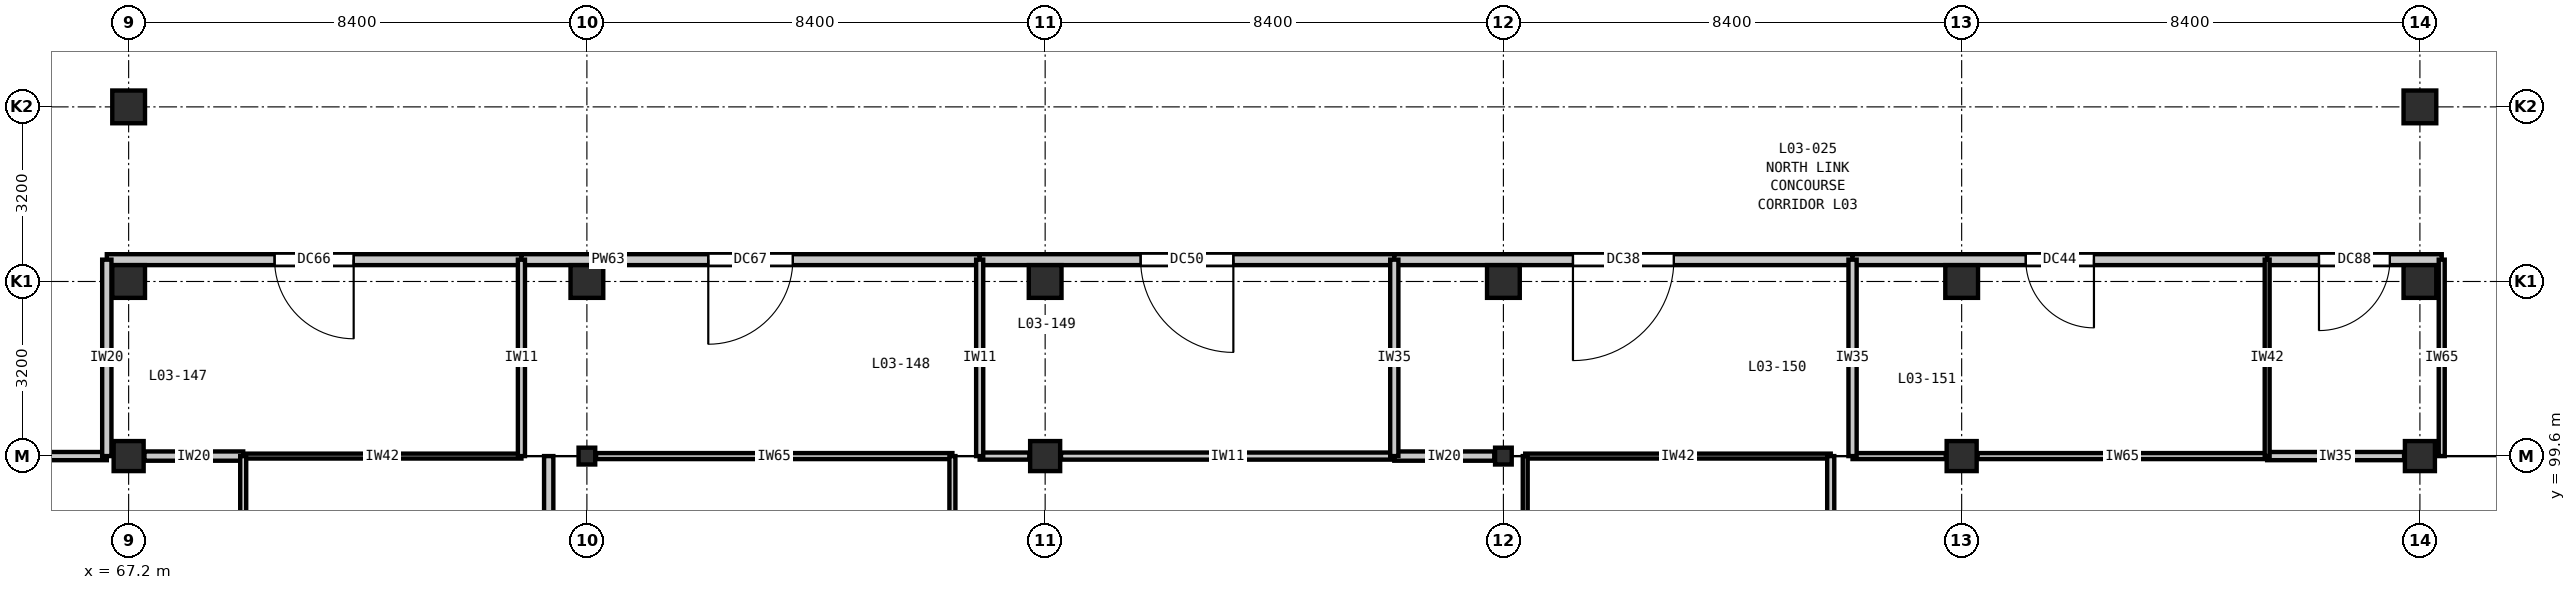
"""IFC4 building model, lengths in metres.
Left out: names, types, materials, properties, quantities, classifications, styles, units other than length and angle.
Written with IfcOpenShell. Run it as: python <this file> out.ifc"""

import sys

from ifc_helpers import new_model, si_unit, direction, frame, frame_2d, origin, origin_2d, place, context, subcontext, project, spatial, rectangle, i_section, extrude, element, fill, save


model = new_model("IFC4")
c1 = context("Model", 3, precision=1e-05, world=origin(), true_north=direction((0.0, 1.0)))
c2 = subcontext(c1, "Body", "Model", "MODEL_VIEW")
j1 = project(units=[si_unit("LENGTHUNIT", "METRE"), si_unit("PLANEANGLEUNIT", "RADIAN")], contexts=[c1])
p1 = place(None, origin())
s1 = spatial("IfcSite", under=j1, at=p1, CompositionType="ELEMENT")
p2 = place(p1, origin())
s2 = spatial("IfcBuilding", under=s1, at=p2, CompositionType="ELEMENT")
p3 = place(p2, frame((0.0, 0.0, 16.2)))
s3 = spatial("IfcBuildingStorey", under=s2, at=p3, CompositionType="ELEMENT", Elevation=16.2)
p4 = place(p3, frame((67.2, 99.6, 0.0), z_axis=(0.0, 0.0, 1.0), x_axis=(1.0, 0.0, 0.0)))
e1 = element("IfcColumn", 1, at=p4, inside=s3, PredefinedType="COLUMN", context=c2, shape_type="SweptSolid", body=[
    extrude(rectangle(XDim=0.55, YDim=0.55, at=origin_2d()), origin(), (0.0, 0.0, 1.0), 4.2),
])
for number, where, z_axis, x_axis in (
    (2, (67.2, 102.8, 0.0), (0.0, 0.0, 1.0), (1.0, 0.0, 0.0)),
    (3, (67.2, 106.0, 0.0), (0.0, 0.0, 1.0), (1.0, 0.0, 0.0)),
):
    element("IfcColumn", number, at=place(p3, frame(where, z_axis=z_axis, x_axis=x_axis)), inside=s3, PredefinedType="COLUMN", context=c2, shape_type="SweptSolid", body=[
        extrude(rectangle(XDim=0.6, YDim=0.6, at=origin_2d()), origin(), (0.0, 0.0, 1.0), 4.2),
    ])
p5 = place(p3, frame((75.6, 99.6, 0.0), z_axis=(0.0, 0.0, 1.0), x_axis=(1.0, 0.0, 0.0)))
e4 = element("IfcColumn", 4, at=p5, inside=s3, PredefinedType="COLUMN", context=c2, shape_type="SweptSolid", body=[
    extrude(i_section(OverallWidth=0.305, OverallDepth=0.308, WebThickness=0.01, FlangeThickness=0.015, FilletRadius=0.015, at=origin_2d()), origin(), (0.0, 0.0, 1.0), 4.2),
])
p6 = place(p3, frame((75.6, 102.8, 0.0), z_axis=(0.0, 0.0, 1.0), x_axis=(1.0, 0.0, 0.0)))
e5 = element("IfcColumn", 5, at=p6, inside=s3, PredefinedType="COLUMN", context=c2, shape_type="SweptSolid", body=[
    extrude(rectangle(XDim=0.6, YDim=0.6, at=origin_2d()), origin(), (0.0, 0.0, 1.0), 4.2),
])
p7 = place(p3, frame((84.0, 99.6, 0.0), z_axis=(0.0, 0.0, 1.0), x_axis=(1.0, 0.0, 0.0)))
e6 = element("IfcColumn", 6, at=p7, inside=s3, PredefinedType="COLUMN", context=c2, shape_type="SweptSolid", body=[
    extrude(rectangle(XDim=0.55, YDim=0.55, at=origin_2d()), origin(), (0.0, 0.0, 1.0), 4.2),
])
p8 = place(p3, frame((84.0, 102.8, 0.0), z_axis=(0.0, 0.0, 1.0), x_axis=(1.0, 0.0, 0.0)))
e7 = element("IfcColumn", 7, at=p8, inside=s3, PredefinedType="COLUMN", context=c2, shape_type="SweptSolid", body=[
    extrude(rectangle(XDim=0.6, YDim=0.6, at=origin_2d()), origin(), (0.0, 0.0, 1.0), 4.2),
])
p9 = place(p3, frame((92.4, 99.6, 0.0), z_axis=(0.0, 0.0, 1.0), x_axis=(1.0, 0.0, 0.0)))
e8 = element("IfcColumn", 8, at=p9, inside=s3, PredefinedType="COLUMN", context=c2, shape_type="SweptSolid", body=[
    extrude(i_section(OverallWidth=0.305, OverallDepth=0.308, WebThickness=0.01, FlangeThickness=0.015, FilletRadius=0.015, at=origin_2d()), origin(), (0.0, 0.0, 1.0), 4.2),
])
p10 = place(p3, frame((92.4, 102.8, 0.0), z_axis=(0.0, 0.0, 1.0), x_axis=(1.0, 0.0, 0.0)))
e9 = element("IfcColumn", 9, at=p10, inside=s3, PredefinedType="COLUMN", context=c2, shape_type="SweptSolid", body=[
    extrude(rectangle(XDim=0.6, YDim=0.6, at=origin_2d()), origin(), (0.0, 0.0, 1.0), 4.2),
])
p11 = place(p3, frame((100.8, 99.6, 0.0), z_axis=(0.0, 0.0, 1.0), x_axis=(1.0, 0.0, 0.0)))
e10 = element("IfcColumn", 10, at=p11, inside=s3, PredefinedType="COLUMN", context=c2, shape_type="SweptSolid", body=[
    extrude(rectangle(XDim=0.55, YDim=0.55, at=origin_2d()), origin(), (0.0, 0.0, 1.0), 4.2),
])
p12 = place(p3, frame((100.8, 102.8, 0.0), z_axis=(0.0, 0.0, 1.0), x_axis=(1.0, 0.0, 0.0)))
e11 = element("IfcColumn", 11, at=p12, inside=s3, PredefinedType="COLUMN", context=c2, shape_type="SweptSolid", body=[
    extrude(rectangle(XDim=0.6, YDim=0.6, at=origin_2d()), origin(), (0.0, 0.0, 1.0), 4.2),
])
p13 = place(p3, frame((109.2, 99.6, 0.0), z_axis=(0.0, 0.0, 1.0), x_axis=(1.0, 0.0, 0.0)))
e12 = element("IfcColumn", 12, at=p13, inside=s3, PredefinedType="COLUMN", context=c2, shape_type="SweptSolid", body=[
    extrude(rectangle(XDim=0.55, YDim=0.55, at=origin_2d()), origin(), (0.0, 0.0, 1.0), 4.2),
])
for number, where, z_axis, x_axis in (
    (13, (109.2, 102.8, 0.0), (0.0, 0.0, 1.0), (1.0, 0.0, 0.0)),
    (14, (109.2, 106.0, 0.0), (0.0, 0.0, 1.0), (1.0, 0.0, 0.0)),
):
    element("IfcColumn", number, at=place(p3, frame(where, z_axis=z_axis, x_axis=x_axis)), inside=s3, PredefinedType="COLUMN", context=c2, shape_type="SweptSolid", body=[
        extrude(rectangle(XDim=0.6, YDim=0.6, at=origin_2d()), origin(), (0.0, 0.0, 1.0), 4.2),
    ])
p14 = place(p3, frame((63.6, 99.6, 0.0), z_axis=(0.0, 0.0, 1.0), x_axis=(1.0, 0.0, 0.0)))
e15 = element("IfcWall", 15, at=p14, inside=s3, PredefinedType="PARTITIONING", context=c2, shape_type="SweptSolid", body=[
    extrude(rectangle(XDim=3.2, YDim=0.15, at=frame_2d((1.6, 0.0))), origin(), (0.0, 0.0, 1.0), 3.535),
])
p15 = place(p3, frame((67.49, 99.6, 0.0), z_axis=(0.0, 0.0, 1.0), x_axis=(1.0, 0.0, 0.0)))
e16 = element("IfcWall", 16, at=p15, inside=s3, PredefinedType="PARTITIONING", context=c2, shape_type="SweptSolid", body=[
    extrude(rectangle(XDim=1.81, YDim=0.17, at=frame_2d((0.905, 0.0))), origin(), (0.0, 0.0, 1.0), 3.535),
])
p16 = place(p3, frame((69.3, 99.6, 0.0), z_axis=(0.0, 0.0, 1.0), x_axis=(1.0, 0.0, 0.0)))
e17 = element("IfcWall", 17, at=p16, inside=s3, PredefinedType="PARTITIONING", context=c2, shape_type="SweptSolid", body=[
    extrude(rectangle(XDim=5.1, YDim=0.09, at=frame_2d((2.55, 0.0))), origin(), (0.0, 0.0, 1.0), 3.535),
])
p17 = place(p3, frame((75.768, 99.6, 0.0), z_axis=(0.0, 0.0, 1.0), x_axis=(1.0, 0.0, 0.0)))
e18 = element("IfcWall", 18, at=p17, inside=s3, PredefinedType="PARTITIONING", context=c2, shape_type="SweptSolid", body=[
    extrude(rectangle(XDim=6.532, YDim=0.11, at=frame_2d((3.266, 0.0))), origin(), (0.0, 0.0, 1.0), 3.535),
])
p18 = place(p3, frame((84.29, 99.6, 0.0), z_axis=(0.0, 0.0, 1.0), x_axis=(1.0, 0.0, 0.0)))
e19 = element("IfcWall", 19, at=p18, inside=s3, PredefinedType="PARTITIONING", context=c2, shape_type="SweptSolid", body=[
    extrude(rectangle(XDim=6.11, YDim=0.13, at=frame_2d((3.055, 0.0))), origin(), (0.0, 0.0, 1.0), 3.535),
])
p19 = place(p3, frame((82.8, 99.6, 0.0), z_axis=(0.0, 0.0, 1.0), x_axis=(1.0, 0.0, 0.0)))
e20 = element("IfcWall", 20, at=p19, inside=s3, PredefinedType="PARTITIONING", context=c2, shape_type="SweptSolid", body=[
    extrude(rectangle(XDim=0.91, YDim=0.13, at=frame_2d((0.455, 0.0))), origin(), (0.0, 0.0, 1.0), 3.535),
])
p20 = place(p3, frame((90.4, 99.6, 0.0), z_axis=(0.0, 0.0, 1.0), x_axis=(1.0, 0.0, 0.0)))
e21 = element("IfcWall", 21, at=p20, inside=s3, PredefinedType="PARTITIONING", context=c2, shape_type="SweptSolid", body=[
    extrude(rectangle(XDim=1.833, YDim=0.17, at=frame_2d((0.916, 0.0))), origin(), (0.0, 0.0, 1.0), 3.535),
])
p21 = place(p3, frame((92.8, 99.6, 0.0), z_axis=(0.0, 0.0, 1.0), x_axis=(1.0, 0.0, 0.0)))
e22 = element("IfcWall", 22, at=p21, inside=s3, PredefinedType="PARTITIONING", context=c2, shape_type="SweptSolid", body=[
    extrude(rectangle(XDim=5.6, YDim=0.09, at=frame_2d((2.8, 0.0))), origin(), (0.0, 0.0, 1.0), 3.535),
])
p22 = place(p3, frame((101.09, 99.6, 0.0), z_axis=(0.0, 0.0, 1.0), x_axis=(1.0, 0.0, 0.0)))
e23 = element("IfcWall", 23, at=p22, inside=s3, PredefinedType="PARTITIONING", context=c2, shape_type="SweptSolid", body=[
    extrude(rectangle(XDim=5.31, YDim=0.11, at=frame_2d((2.655, 0.0))), origin(), (0.0, 0.0, 1.0), 3.535),
])
p23 = place(p3, frame((98.8, 99.6, 0.0), z_axis=(0.0, 0.0, 1.0), x_axis=(1.0, 0.0, 0.0)))
e24 = element("IfcWall", 24, at=p23, inside=s3, PredefinedType="PARTITIONING", context=c2, shape_type="SweptSolid", body=[
    extrude(rectangle(XDim=1.71, YDim=0.11, at=frame_2d((0.855, 0.0))), origin(), (0.0, 0.0, 1.0), 3.535),
])
p24 = place(p3, frame((106.4, 99.6, 0.0), z_axis=(0.0, 0.0, 1.0), x_axis=(1.0, 0.0, 0.0)))
e25 = element("IfcWall", 25, at=p24, inside=s3, PredefinedType="PARTITIONING", context=c2, shape_type="SweptSolid", body=[
    extrude(rectangle(XDim=2.51, YDim=0.15, at=frame_2d((1.255, 0.0))), origin(), (0.0, 0.0, 1.0), 3.535),
])
p25 = place(p3, frame((66.8, 103.2, 0.0), z_axis=(0.0, 0.0, 1.0), x_axis=(1.0, 0.0, 0.0)))
e26 = element("IfcWall", 26, at=p25, inside=s3, PredefinedType="PARTITIONING", context=c2, shape_type="SweptSolid", body=[
    extrude(rectangle(XDim=7.6, YDim=0.2, at=frame_2d((3.8, 0.0))), origin(), (0.0, 0.0, 1.0), 3.89),
])
p26 = place(p25, frame((3.075, 0.0, 0.0)))
e27 = element("IfcOpeningElement", 27, at=p26, cuts=e26, PredefinedType="OPENING", context=c2, shape_type="SweptSolid", body=[
    extrude(rectangle(XDim=1.45, YDim=2.25, at=frame_2d((0.725, 1.125))), frame((0.0, 0.11, 0.0), z_axis=(0.0, -1.0, 0.0), x_axis=(1.0, 0.0, 0.0)), (0.0, 0.0, 1.0), 0.22),
])
p27 = place(p3, frame((74.4, 103.2, 0.0), z_axis=(0.0, 0.0, 1.0), x_axis=(1.0, 0.0, 0.0)))
e28 = element("IfcWall", 28, at=p27, inside=s3, PredefinedType="PARTITIONING", context=c2, shape_type="SweptSolid", body=[
    extrude(rectangle(XDim=8.4, YDim=0.2, at=frame_2d((4.2, 0.0))), origin(), (0.0, 0.0, 1.0), 3.89),
])
p28 = place(p27, frame((3.425, 0.0, 0.0)))
e29 = element("IfcOpeningElement", 29, at=p28, cuts=e28, PredefinedType="OPENING", context=c2, shape_type="SweptSolid", body=[
    extrude(rectangle(XDim=1.55, YDim=2.25, at=frame_2d((0.775, 1.125))), frame((0.0, 0.11, 0.0), z_axis=(0.0, -1.0, 0.0), x_axis=(1.0, 0.0, 0.0)), (0.0, 0.0, 1.0), 0.22),
])
p29 = place(p3, frame((82.8, 103.2, 0.0), z_axis=(0.0, 0.0, 1.0), x_axis=(1.0, 0.0, 0.0)))
e30 = element("IfcWall", 30, at=p29, inside=s3, PredefinedType="PARTITIONING", context=c2, shape_type="SweptSolid", body=[
    extrude(rectangle(XDim=7.6, YDim=0.2, at=frame_2d((3.8, 0.0))), origin(), (0.0, 0.0, 1.0), 3.89),
])
p30 = place(p29, frame((2.95, 0.0, 0.0)))
e31 = element("IfcOpeningElement", 31, at=p30, cuts=e30, PredefinedType="OPENING", context=c2, shape_type="SweptSolid", body=[
    extrude(rectangle(XDim=1.7, YDim=2.3, at=frame_2d((0.85, 1.15))), frame((0.0, 0.11, 0.0), z_axis=(0.0, -1.0, 0.0), x_axis=(1.0, 0.0, 0.0)), (0.0, 0.0, 1.0), 0.22),
])
p31 = place(p3, frame((90.4, 103.2, 0.0), z_axis=(0.0, 0.0, 1.0), x_axis=(1.0, 0.0, 0.0)))
e32 = element("IfcWall", 32, at=p31, inside=s3, PredefinedType="PARTITIONING", context=c2, shape_type="SweptSolid", body=[
    extrude(rectangle(XDim=8.4, YDim=0.2, at=frame_2d((4.2, 0.0))), origin(), (0.0, 0.0, 1.0), 3.89),
])
p32 = place(p31, frame((3.275, 0.0, 0.0)))
e33 = element("IfcOpeningElement", 33, at=p32, cuts=e32, PredefinedType="OPENING", context=c2, shape_type="SweptSolid", body=[
    extrude(rectangle(XDim=1.85, YDim=2.3, at=frame_2d((0.925, 1.15))), frame((0.0, 0.11, 0.0), z_axis=(0.0, -1.0, 0.0), x_axis=(1.0, 0.0, 0.0)), (0.0, 0.0, 1.0), 0.22),
])
p33 = place(p3, frame((98.8, 103.2, 0.0), z_axis=(0.0, 0.0, 1.0), x_axis=(1.0, 0.0, 0.0)))
e34 = element("IfcWall", 34, at=p33, inside=s3, PredefinedType="PARTITIONING", context=c2, shape_type="SweptSolid", body=[
    extrude(rectangle(XDim=7.6, YDim=0.2, at=frame_2d((3.8, 0.0))), origin(), (0.0, 0.0, 1.0), 3.89),
])
p34 = place(p33, frame((3.175, 0.0, 0.0)))
e35 = element("IfcOpeningElement", 35, at=p34, cuts=e34, PredefinedType="OPENING", context=c2, shape_type="SweptSolid", body=[
    extrude(rectangle(XDim=1.25, YDim=2.15, at=frame_2d((0.625, 1.075))), frame((0.0, 0.11, 0.0), z_axis=(0.0, -1.0, 0.0), x_axis=(1.0, 0.0, 0.0)), (0.0, 0.0, 1.0), 0.22),
])
p35 = place(p3, frame((106.4, 103.2, 0.0), z_axis=(0.0, 0.0, 1.0), x_axis=(1.0, 0.0, 0.0)))
e36 = element("IfcWall", 36, at=p35, inside=s3, PredefinedType="PARTITIONING", context=c2, shape_type="SweptSolid", body=[
    extrude(rectangle(XDim=3.2, YDim=0.2, at=frame_2d((1.6, 0.0))), origin(), (0.0, 0.0, 1.0), 3.89),
])
p36 = place(p35, frame((0.95, 0.0, 0.0)))
e37 = element("IfcOpeningElement", 37, at=p36, cuts=e36, PredefinedType="OPENING", context=c2, shape_type="SweptSolid", body=[
    extrude(rectangle(XDim=1.3, YDim=2.2, at=frame_2d((0.65, 1.1))), frame((0.0, 0.11, 0.0), z_axis=(0.0, -1.0, 0.0), x_axis=(1.0, 0.0, 0.0)), (0.0, 0.0, 1.0), 0.22),
])
p37 = place(p3, frame((66.8, 99.6, 0.0), z_axis=(0.0, 0.0, 1.0), x_axis=(0.0, 1.0, 0.0)))
e38 = element("IfcWall", 38, at=p37, inside=s3, PredefinedType="PARTITIONING", context=c2, shape_type="SweptSolid", body=[
    extrude(rectangle(XDim=3.6, YDim=0.17, at=frame_2d((1.8, 0.0))), origin(), (0.0, 0.0, 1.0), 3.89),
])
p38 = place(p3, frame((69.3, 88.6, 0.0), z_axis=(0.0, 0.0, 1.0), x_axis=(0.0, 1.0, 0.0)))
e39 = element("IfcWall", 39, at=p38, inside=s3, PredefinedType="PARTITIONING", context=c2, shape_type="SweptSolid", body=[
    extrude(rectangle(XDim=11.0, YDim=0.11, at=frame_2d((5.5, 0.0))), origin(), (0.0, 0.0, 1.0), 3.89),
])
p39 = place(p3, frame((74.4, 99.6, 0.0), z_axis=(0.0, 0.0, 1.0), x_axis=(0.0, 1.0, 0.0)))
e40 = element("IfcWall", 40, at=p39, inside=s3, PredefinedType="PARTITIONING", context=c2, shape_type="SweptSolid", body=[
    extrude(rectangle(XDim=3.6, YDim=0.13, at=frame_2d((1.8, 0.0))), origin(), (0.0, 0.0, 1.0), 3.89),
])
p40 = place(p3, frame((74.9, 88.6, 0.0), z_axis=(0.0, 0.0, 1.0), x_axis=(0.0, 1.0, 0.0)))
e41 = element("IfcWall", 41, at=p40, inside=s3, PredefinedType="PARTITIONING", context=c2, shape_type="SweptSolid", body=[
    extrude(rectangle(XDim=11.0, YDim=0.17, at=frame_2d((5.5, 0.0))), origin(), (0.0, 0.0, 1.0), 3.89),
])
p41 = place(p3, frame((82.3, 88.6, 0.0), z_axis=(0.0, 0.0, 1.0), x_axis=(0.0, 1.0, 0.0)))
e42 = element("IfcWall", 42, at=p41, inside=s3, PredefinedType="PARTITIONING", context=c2, shape_type="SweptSolid", body=[
    extrude(rectangle(XDim=11.0, YDim=0.11, at=frame_2d((5.5, 0.0))), origin(), (0.0, 0.0, 1.0), 3.89),
])
p42 = place(p3, frame((82.8, 99.6, 0.0), z_axis=(0.0, 0.0, 1.0), x_axis=(0.0, 1.0, 0.0)))
e43 = element("IfcWall", 43, at=p42, inside=s3, PredefinedType="PARTITIONING", context=c2, shape_type="SweptSolid", body=[
    extrude(rectangle(XDim=3.6, YDim=0.13, at=frame_2d((1.8, 0.0))), origin(), (0.0, 0.0, 1.0), 3.89),
])
p43 = place(p3, frame((90.4, 99.6, 0.0), z_axis=(0.0, 0.0, 1.0), x_axis=(0.0, 1.0, 0.0)))
e44 = element("IfcWall", 44, at=p43, inside=s3, PredefinedType="PARTITIONING", context=c2, shape_type="SweptSolid", body=[
    extrude(rectangle(XDim=3.6, YDim=0.15, at=frame_2d((1.8, 0.0))), origin(), (0.0, 0.0, 1.0), 3.89),
])
p44 = place(p3, frame((92.8, 88.6, 0.0), z_axis=(0.0, 0.0, 1.0), x_axis=(0.0, 1.0, 0.0)))
e45 = element("IfcWall", 45, at=p44, inside=s3, PredefinedType="PARTITIONING", context=c2, shape_type="SweptSolid", body=[
    extrude(rectangle(XDim=11.0, YDim=0.09, at=frame_2d((5.5, 0.0))), origin(), (0.0, 0.0, 1.0), 3.89),
])
p45 = place(p3, frame((98.4, 88.6, 0.0), z_axis=(0.0, 0.0, 1.0), x_axis=(0.0, 1.0, 0.0)))
e46 = element("IfcWall", 46, at=p45, inside=s3, PredefinedType="PARTITIONING", context=c2, shape_type="SweptSolid", body=[
    extrude(rectangle(XDim=11.0, YDim=0.13, at=frame_2d((5.5, 0.0))), origin(), (0.0, 0.0, 1.0), 3.89),
])
p46 = place(p3, frame((98.8, 99.6, 0.0), z_axis=(0.0, 0.0, 1.0), x_axis=(0.0, 1.0, 0.0)))
e47 = element("IfcWall", 47, at=p46, inside=s3, PredefinedType="PARTITIONING", context=c2, shape_type="SweptSolid", body=[
    extrude(rectangle(XDim=3.6, YDim=0.15, at=frame_2d((1.8, 0.0))), origin(), (0.0, 0.0, 1.0), 3.89),
])
p47 = place(p3, frame((106.4, 99.6, 0.0), z_axis=(0.0, 0.0, 1.0), x_axis=(0.0, 1.0, 0.0)))
e48 = element("IfcWall", 48, at=p47, inside=s3, PredefinedType="PARTITIONING", context=c2, shape_type="SweptSolid", body=[
    extrude(rectangle(XDim=3.6, YDim=0.09, at=frame_2d((1.8, 0.0))), origin(), (0.0, 0.0, 1.0), 3.89),
])
p48 = place(p3, frame((109.6, 99.6, 0.0), z_axis=(0.0, 0.0, 1.0), x_axis=(0.0, 1.0, 0.0)))
e49 = element("IfcWall", 49, at=p48, inside=s3, PredefinedType="PARTITIONING", context=c2, shape_type="SweptSolid", body=[
    extrude(rectangle(XDim=3.6, YDim=0.11, at=frame_2d((1.8, 0.0))), origin(), (0.0, 0.0, 1.0), 3.89),
])
p49 = place(p26, frame((1.45, 0.0, 0.0), z_axis=(0.0, 0.0, 1.0), x_axis=(-1.0, 0.0, 0.0)))
e50 = element("IfcDoor", 50, at=p49, inside=s3, OperationType="SINGLE_SWING_LEFT", PredefinedType="DOOR", context=c2, shape_type="SweptSolid", body=[
    extrude(rectangle(XDim=1.45, YDim=2.25, at=frame_2d((0.725, 1.125))), frame((0.0, 0.025, 0.0), z_axis=(0.0, -1.0, 0.0), x_axis=(1.0, 0.0, 0.0)), (0.0, 0.0, 1.0), 0.05),
])
fill(e27, e50)
p50 = place(p28, frame((1.55, 0.0, 0.0), z_axis=(0.0, 0.0, 1.0), x_axis=(-1.0, 0.0, 0.0)))
e51 = element("IfcDoor", 51, at=p50, inside=s3, OperationType="SINGLE_SWING_RIGHT", PredefinedType="DOOR", context=c2, shape_type="SweptSolid", body=[
    extrude(rectangle(XDim=1.55, YDim=2.25, at=frame_2d((0.775, 1.125))), frame((0.0, 0.025, 0.0), z_axis=(0.0, -1.0, 0.0), x_axis=(1.0, 0.0, 0.0)), (0.0, 0.0, 1.0), 0.05),
])
fill(e29, e51)
p51 = place(p30, frame((1.7, 0.0, 0.0), z_axis=(0.0, 0.0, 1.0), x_axis=(-1.0, 0.0, 0.0)))
e52 = element("IfcDoor", 52, at=p51, inside=s3, OperationType="SINGLE_SWING_LEFT", PredefinedType="DOOR", context=c2, shape_type="SweptSolid", body=[
    extrude(rectangle(XDim=1.7, YDim=2.3, at=frame_2d((0.85, 1.15))), frame((0.0, 0.025, 0.0), z_axis=(0.0, -1.0, 0.0), x_axis=(1.0, 0.0, 0.0)), (0.0, 0.0, 1.0), 0.05),
])
fill(e31, e52)
p52 = place(p32, frame((1.85, 0.0, 0.0), z_axis=(0.0, 0.0, 1.0), x_axis=(-1.0, 0.0, 0.0)))
e53 = element("IfcDoor", 53, at=p52, inside=s3, OperationType="SINGLE_SWING_RIGHT", PredefinedType="DOOR", context=c2, shape_type="SweptSolid", body=[
    extrude(rectangle(XDim=1.85, YDim=2.3, at=frame_2d((0.925, 1.15))), frame((0.0, 0.025, 0.0), z_axis=(0.0, -1.0, 0.0), x_axis=(1.0, 0.0, 0.0)), (0.0, 0.0, 1.0), 0.05),
])
fill(e33, e53)
p53 = place(p34, frame((1.25, 0.0, 0.0), z_axis=(0.0, 0.0, 1.0), x_axis=(-1.0, 0.0, 0.0)))
e54 = element("IfcDoor", 54, at=p53, inside=s3, OperationType="SINGLE_SWING_LEFT", PredefinedType="DOOR", context=c2, shape_type="SweptSolid", body=[
    extrude(rectangle(XDim=1.25, YDim=2.15, at=frame_2d((0.625, 1.075))), frame((0.0, 0.025, 0.0), z_axis=(0.0, -1.0, 0.0), x_axis=(1.0, 0.0, 0.0)), (0.0, 0.0, 1.0), 0.05),
])
fill(e35, e54)
p54 = place(p36, frame((1.3, 0.0, 0.0), z_axis=(0.0, 0.0, 1.0), x_axis=(-1.0, 0.0, 0.0)))
e55 = element("IfcDoor", 55, at=p54, inside=s3, OperationType="SINGLE_SWING_RIGHT", PredefinedType="DOOR", context=c2, shape_type="SweptSolid", body=[
    extrude(rectangle(XDim=1.3, YDim=2.2, at=frame_2d((0.65, 1.1))), frame((0.0, 0.025, 0.0), z_axis=(0.0, -1.0, 0.0), x_axis=(1.0, 0.0, 0.0)), (0.0, 0.0, 1.0), 0.05),
])
fill(e37, e55)
save(model, sys.argv[1])
